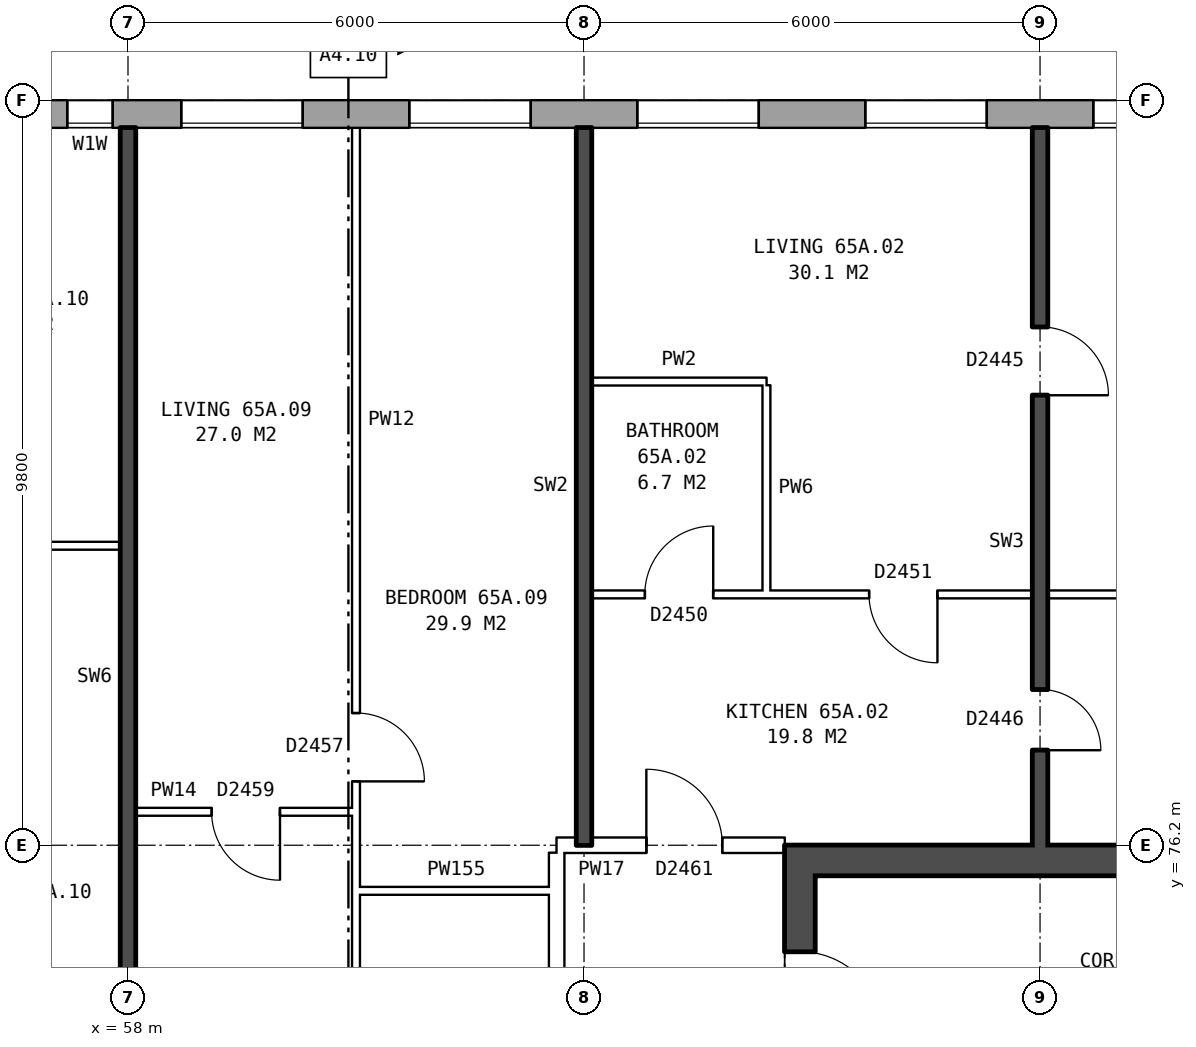
"""IFC4 building model, lengths in metres.
Left out: names, types, materials, properties, quantities, classifications, styles, units other than length and angle.
Written with IfcOpenShell. Run it as: python <this file> out.ifc"""

import sys

from ifc_helpers import new_model, si_unit, direction, frame, frame_2d, origin, place, context, subcontext, project, spatial, rectangle, extrude, element, fill, save


model = new_model("IFC4")
c1 = context("Model", 3, precision=1e-05, world=origin(), true_north=direction((0.0, 1.0)))
c2 = subcontext(c1, "Body", "Model", "MODEL_VIEW")
j1 = project(units=[si_unit("LENGTHUNIT", "METRE"), si_unit("PLANEANGLEUNIT", "RADIAN")], contexts=[c1])
p1 = place(None, origin())
s1 = spatial("IfcSite", under=j1, at=p1, CompositionType="ELEMENT")
p2 = place(p1, origin())
s2 = spatial("IfcBuilding", under=s1, at=p2, CompositionType="ELEMENT")
p3 = place(p2, frame((0.0, 0.0, 230.7)))
s3 = spatial("IfcBuildingStorey", under=s2, at=p3, CompositionType="ELEMENT", Elevation=230.7)
p4 = place(p3, frame((74.95, 85.82, 0.0), z_axis=(0.0, 0.0, 1.0), x_axis=(-1.0, 0.0, 0.0)))
e1 = element("IfcWall", 1, at=p4, inside=s3, PredefinedType="STANDARD", context=c2, shape_type="SweptSolid", body=[
    extrude(rectangle(XDim=39.875, YDim=0.36, at=frame_2d((19.938, 0.0))), origin(), (0.0, 0.0, 1.0), 2.85),
])
p5 = place(p4, frame((2.65, 0.0, 0.8)))
e2 = element("IfcOpeningElement", 2, at=p5, cuts=e1, PredefinedType="OPENING", context=c2, shape_type="SweptSolid", body=[
    extrude(rectangle(XDim=1.6, YDim=1.8, at=frame_2d((0.8, 0.9))), frame((0.0, 0.19, 0.0), z_axis=(0.0, -1.0, 0.0), x_axis=(1.0, 0.0, 0.0)), (0.0, 0.0, 1.0), 0.38),
])
p6 = place(p4, frame((5.65, 0.0, 0.8)))
e3 = element("IfcOpeningElement", 3, at=p6, cuts=e1, PredefinedType="OPENING", context=c2, shape_type="SweptSolid", body=[
    extrude(rectangle(XDim=1.6, YDim=1.8, at=frame_2d((0.8, 0.9))), frame((0.0, 0.19, 0.0), z_axis=(0.0, -1.0, 0.0), x_axis=(1.0, 0.0, 0.0)), (0.0, 0.0, 1.0), 0.38),
])
p7 = place(p4, frame((8.65, 0.0, 0.8)))
e4 = element("IfcOpeningElement", 4, at=p7, cuts=e1, PredefinedType="OPENING", context=c2, shape_type="SweptSolid", body=[
    extrude(rectangle(XDim=1.6, YDim=1.8, at=frame_2d((0.8, 0.9))), frame((0.0, 0.19, 0.0), z_axis=(0.0, -1.0, 0.0), x_axis=(1.0, 0.0, 0.0)), (0.0, 0.0, 1.0), 0.38),
])
p8 = place(p4, frame((11.65, 0.0, 0.8)))
e5 = element("IfcOpeningElement", 5, at=p8, cuts=e1, PredefinedType="OPENING", context=c2, shape_type="SweptSolid", body=[
    extrude(rectangle(XDim=1.6, YDim=1.8, at=frame_2d((0.8, 0.9))), frame((0.0, 0.19, 0.0), z_axis=(0.0, -1.0, 0.0), x_axis=(1.0, 0.0, 0.0)), (0.0, 0.0, 1.0), 0.38),
])
p9 = place(p4, frame((14.65, 0.0, 0.8)))
e6 = element("IfcOpeningElement", 6, at=p9, cuts=e1, PredefinedType="OPENING", context=c2, shape_type="SweptSolid", body=[
    extrude(rectangle(XDim=1.6, YDim=1.8, at=frame_2d((0.8, 0.9))), frame((0.0, 0.19, 0.0), z_axis=(0.0, -1.0, 0.0), x_axis=(1.0, 0.0, 0.0)), (0.0, 0.0, 1.0), 0.38),
])
p10 = place(p4, frame((17.15, 0.0, 1.7)))
e7 = element("IfcOpeningElement", 7, at=p10, cuts=e1, PredefinedType="OPENING", context=c2, shape_type="SweptSolid", body=[
    extrude(rectangle(XDim=0.6, YDim=0.9, at=frame_2d((0.3, 0.45))), frame((0.0, 0.19, 0.0), z_axis=(0.0, -1.0, 0.0), x_axis=(1.0, 0.0, 0.0)), (0.0, 0.0, 1.0), 0.38),
])
p11 = place(p4, frame((20.65, 0.0, 0.8)))
e8 = element("IfcOpeningElement", 8, at=p11, cuts=e1, PredefinedType="OPENING", context=c2, shape_type="SweptSolid", body=[
    extrude(rectangle(XDim=1.6, YDim=1.8, at=frame_2d((0.8, 0.9))), frame((0.0, 0.19, 0.0), z_axis=(0.0, -1.0, 0.0), x_axis=(1.0, 0.0, 0.0)), (0.0, 0.0, 1.0), 0.38),
])
p12 = place(p4, frame((24.7, 0.0, 0.8)))
e9 = element("IfcOpeningElement", 9, at=p12, cuts=e1, PredefinedType="OPENING", context=c2, shape_type="SweptSolid", body=[
    extrude(rectangle(XDim=1.0, YDim=1.8, at=frame_2d((0.5, 0.9))), frame((0.0, 0.19, 0.0), z_axis=(0.0, -1.0, 0.0), x_axis=(1.0, 0.0, 0.0)), (0.0, 0.0, 1.0), 0.38),
])
p13 = place(p4, frame((26.65, 0.0, 0.8)))
e10 = element("IfcOpeningElement", 10, at=p13, cuts=e1, PredefinedType="OPENING", context=c2, shape_type="SweptSolid", body=[
    extrude(rectangle(XDim=1.6, YDim=1.8, at=frame_2d((0.8, 0.9))), frame((0.0, 0.19, 0.0), z_axis=(0.0, -1.0, 0.0), x_axis=(1.0, 0.0, 0.0)), (0.0, 0.0, 1.0), 0.38),
])
p14 = place(p4, frame((29.65, 0.0, 0.8)))
e11 = element("IfcOpeningElement", 11, at=p14, cuts=e1, PredefinedType="OPENING", context=c2, shape_type="SweptSolid", body=[
    extrude(rectangle(XDim=1.6, YDim=1.8, at=frame_2d((0.8, 0.9))), frame((0.0, 0.19, 0.0), z_axis=(0.0, -1.0, 0.0), x_axis=(1.0, 0.0, 0.0)), (0.0, 0.0, 1.0), 0.38),
])
p15 = place(p4, frame((32.65, 0.0, 0.8)))
e12 = element("IfcOpeningElement", 12, at=p15, cuts=e1, PredefinedType="OPENING", context=c2, shape_type="SweptSolid", body=[
    extrude(rectangle(XDim=1.6, YDim=1.8, at=frame_2d((0.8, 0.9))), frame((0.0, 0.19, 0.0), z_axis=(0.0, -1.0, 0.0), x_axis=(1.0, 0.0, 0.0)), (0.0, 0.0, 1.0), 0.38),
])
p16 = place(p4, frame((35.65, 0.0, 0.8)))
e13 = element("IfcOpeningElement", 13, at=p16, cuts=e1, PredefinedType="OPENING", context=c2, shape_type="SweptSolid", body=[
    extrude(rectangle(XDim=1.6, YDim=1.8, at=frame_2d((0.8, 0.9))), frame((0.0, 0.19, 0.0), z_axis=(0.0, -1.0, 0.0), x_axis=(1.0, 0.0, 0.0)), (0.0, 0.0, 1.0), 0.38),
])
p17 = place(p4, frame((19.1, 0.0, 0.8)))
e14 = element("IfcOpeningElement", 14, at=p17, cuts=e1, PredefinedType="OPENING", context=c2, shape_type="SweptSolid", body=[
    extrude(rectangle(XDim=0.6, YDim=1.2, at=frame_2d((0.3, 0.6))), frame((0.0, 0.19, 0.0), z_axis=(0.0, -1.0, 0.0), x_axis=(1.0, 0.0, 0.0)), (0.0, 0.0, 1.0), 0.38),
])
p18 = place(p3, frame((66.84, 63.8, 0.0), z_axis=(0.0, 0.0, 1.0), x_axis=(0.0, 1.0, 0.0)))
e15 = element("IfcWall", 15, at=p18, inside=s3, PredefinedType="SHEAR", context=c2, shape_type="SweptSolid", body=[
    extrude(rectangle(XDim=12.4, YDim=0.4, at=frame_2d((6.2, 0.0))), origin(), (0.0, 0.0, 1.0), 2.85),
])
p19 = place(p18, frame((1.325, 0.0, 0.0)))
e16 = element("IfcOpeningElement", 16, at=p19, cuts=e15, PredefinedType="OPENING", context=c2, shape_type="SweptSolid", body=[
    extrude(rectangle(XDim=1.1, YDim=2.1, at=frame_2d((0.55, 1.05))), frame((0.0, 0.21, 0.0), z_axis=(0.0, -1.0, 0.0), x_axis=(1.0, 0.0, 0.0)), (0.0, 0.0, 1.0), 0.42),
])
p20 = place(p18, frame((3.6, 0.0, 0.0)))
e17 = element("IfcOpeningElement", 17, at=p20, cuts=e15, PredefinedType="OPENING", context=c2, shape_type="SweptSolid", body=[
    extrude(rectangle(XDim=1.1, YDim=2.1, at=frame_2d((0.55, 1.05))), frame((0.0, 0.21, 0.0), z_axis=(0.0, -1.0, 0.0), x_axis=(1.0, 0.0, 0.0)), (0.0, 0.0, 1.0), 0.42),
])
p21 = place(p18, frame((5.8, 0.0, 0.0)))
e18 = element("IfcOpeningElement", 18, at=p21, cuts=e15, PredefinedType="OPENING", context=c2, shape_type="SweptSolid", body=[
    extrude(rectangle(XDim=1.1, YDim=2.1, at=frame_2d((0.55, 1.05))), frame((0.0, 0.21, 0.0), z_axis=(0.0, -1.0, 0.0), x_axis=(1.0, 0.0, 0.0)), (0.0, 0.0, 1.0), 0.42),
])
p22 = place(p18, frame((8.0, 0.0, 0.0)))
e19 = element("IfcOpeningElement", 19, at=p22, cuts=e15, PredefinedType="OPENING", context=c2, shape_type="SweptSolid", body=[
    extrude(rectangle(XDim=1.1, YDim=2.1, at=frame_2d((0.55, 1.05))), frame((0.0, 0.21, 0.0), z_axis=(0.0, -1.0, 0.0), x_axis=(1.0, 0.0, 0.0)), (0.0, 0.0, 1.0), 0.42),
])
p23 = place(p18, frame((9.9, 0.0, 0.0)))
e20 = element("IfcOpeningElement", 20, at=p23, cuts=e15, PredefinedType="OPENING", context=c2, shape_type="SweptSolid", body=[
    extrude(rectangle(XDim=1.1, YDim=2.1, at=frame_2d((0.55, 1.05))), frame((0.0, 0.21, 0.0), z_axis=(0.0, -1.0, 0.0), x_axis=(1.0, 0.0, 0.0)), (0.0, 0.0, 1.0), 0.42),
])
p24 = place(p3, frame((67.04, 76.0, 0.0), z_axis=(0.0, 0.0, 1.0), x_axis=(1.0, 0.0, 0.0)))
e21 = element("IfcWall", 21, at=p24, inside=s3, PredefinedType="SHEAR", context=c2, shape_type="SweptSolid", body=[
    extrude(rectangle(XDim=8.2, YDim=0.4, at=frame_2d((4.1, 0.0))), origin(), (0.0, 0.0, 1.0), 2.85),
])
p25 = place(p3, frame((63.64, 63.9, 0.0), z_axis=(0.0, 0.0, 1.0), x_axis=(0.0, 1.0, 0.0)))
e22 = element("IfcWall", 22, at=p25, inside=s3, PredefinedType="PARTITIONING", context=c2, shape_type="SweptSolid", body=[
    extrude(rectangle(XDim=12.2, YDim=0.2, at=frame_2d((6.1, 0.0))), origin(), (0.0, 0.0, 1.0), 2.85),
])
p26 = place(p25, frame((5.1, 0.0, 0.0)))
e23 = element("IfcOpeningElement", 23, at=p26, cuts=e22, PredefinedType="OPENING", context=c2, shape_type="SweptSolid", body=[
    extrude(rectangle(XDim=2.0, YDim=2.1, at=frame_2d((1.0, 1.05))), frame((0.0, 0.11, 0.0), z_axis=(0.0, -1.0, 0.0), x_axis=(1.0, 0.0, 0.0)), (0.0, 0.0, 1.0), 0.22),
])
p27 = place(p3, frame((61.0, 75.6, 0.0), z_axis=(0.0, 0.0, 1.0), x_axis=(1.0, 0.0, 0.0)))
e24 = element("IfcWall", 24, at=p27, inside=s3, PredefinedType="PARTITIONING", context=c2, shape_type="SweptSolid", body=[
    extrude(rectangle(XDim=2.64, YDim=0.1, at=frame_2d((1.32, 0.0))), origin(), (0.0, 0.0, 1.0), 2.85),
])
p28 = place(p3, frame((63.64, 76.2, 0.0), z_axis=(0.0, 0.0, 1.0), x_axis=(1.0, 0.0, 0.0)))
e25 = element("IfcWall", 25, at=p28, inside=s3, PredefinedType="PARTITIONING", context=c2, shape_type="SweptSolid", body=[
    extrude(rectangle(XDim=3.0, YDim=0.2, at=frame_2d((1.5, 0.0))), origin(), (0.0, 0.0, 1.0), 2.85),
])
p29 = place(p28, frame((1.18, 0.0, 0.0)))
e26 = element("IfcOpeningElement", 26, at=p29, cuts=e25, PredefinedType="OPENING", context=c2, shape_type="SweptSolid", body=[
    extrude(rectangle(XDim=1.0, YDim=2.1, at=frame_2d((0.5, 1.05))), frame((0.0, 0.11, 0.0), z_axis=(0.0, -1.0, 0.0), x_axis=(1.0, 0.0, 0.0)), (0.0, 0.0, 1.0), 0.22),
])
p30 = place(p3, frame((58.1, 76.64, 0.0), z_axis=(0.0, 0.0, 1.0), x_axis=(1.0, 0.0, 0.0)))
e27 = element("IfcWall", 27, at=p30, inside=s3, PredefinedType="PARTITIONING", context=c2, shape_type="SweptSolid", body=[
    extrude(rectangle(XDim=2.9, YDim=0.1, at=frame_2d((1.45, 0.0))), origin(), (0.0, 0.0, 1.0), 2.85),
])
p31 = place(p30, frame((1.0, 0.0, 0.0)))
e28 = element("IfcOpeningElement", 28, at=p31, cuts=e27, PredefinedType="OPENING", context=c2, shape_type="SweptSolid", body=[
    extrude(rectangle(XDim=0.9, YDim=2.1, at=frame_2d((0.45, 1.05))), frame((0.0, 0.06, 0.0), z_axis=(0.0, -1.0, 0.0), x_axis=(1.0, 0.0, 0.0)), (0.0, 0.0, 1.0), 0.12),
])
p32 = place(p3, frame((64.1, 79.5, 0.0), z_axis=(0.0, 0.0, 1.0), x_axis=(1.0, 0.0, 0.0)))
e29 = element("IfcWall", 29, at=p32, inside=s3, PredefinedType="PARTITIONING", context=c2, shape_type="SweptSolid", body=[
    extrude(rectangle(XDim=11.8, YDim=0.1, at=frame_2d((5.9, 0.0))), origin(), (0.0, 0.0, 1.0), 2.85),
])
p33 = place(p32, frame((3.65, 0.0, 0.0)))
e30 = element("IfcOpeningElement", 30, at=p33, cuts=e29, PredefinedType="OPENING", context=c2, shape_type="SweptSolid", body=[
    extrude(rectangle(XDim=0.9, YDim=2.1, at=frame_2d((0.45, 1.05))), frame((0.0, 0.06, 0.0), z_axis=(0.0, -1.0, 0.0), x_axis=(1.0, 0.0, 0.0)), (0.0, 0.0, 1.0), 0.12),
])
p34 = place(p32, frame((0.7, 0.0, 0.0)))
e31 = element("IfcOpeningElement", 31, at=p34, cuts=e29, PredefinedType="OPENING", context=c2, shape_type="SweptSolid", body=[
    extrude(rectangle(XDim=0.9, YDim=2.1, at=frame_2d((0.45, 1.05))), frame((0.0, 0.06, 0.0), z_axis=(0.0, -1.0, 0.0), x_axis=(1.0, 0.0, 0.0)), (0.0, 0.0, 1.0), 0.12),
])
p35 = place(p3, frame((55.0, 80.14, 0.0), z_axis=(0.0, 0.0, 1.0), x_axis=(1.0, 0.0, 0.0)))
e32 = element("IfcWall", 32, at=p35, inside=s3, PredefinedType="PARTITIONING", context=c2, shape_type="SweptSolid", body=[
    extrude(rectangle(XDim=2.9, YDim=0.1, at=frame_2d((1.45, 0.0))), origin(), (0.0, 0.0, 1.0), 2.85),
])
p36 = place(p35, frame((1.0, 0.0, 0.0)))
e33 = element("IfcOpeningElement", 33, at=p36, cuts=e32, PredefinedType="OPENING", context=c2, shape_type="SweptSolid", body=[
    extrude(rectangle(XDim=0.9, YDim=2.1, at=frame_2d((0.45, 1.05))), frame((0.0, 0.06, 0.0), z_axis=(0.0, -1.0, 0.0), x_axis=(1.0, 0.0, 0.0)), (0.0, 0.0, 1.0), 0.12),
])
p37 = place(p3, frame((64.1, 82.3, 0.0), z_axis=(0.0, 0.0, 1.0), x_axis=(1.0, 0.0, 0.0)))
e34 = element("IfcWall", 34, at=p37, inside=s3, PredefinedType="PARTITIONING", context=c2, shape_type="SweptSolid", body=[
    extrude(rectangle(XDim=2.3, YDim=0.1, at=frame_2d((1.15, 0.0))), origin(), (0.0, 0.0, 1.0), 2.85),
])
p38 = place(p3, frame((58.0, 71.2, 0.0), z_axis=(0.0, 0.0, 1.0), x_axis=(0.0, 1.0, 0.0)))
e35 = element("IfcWall", 35, at=p38, inside=s3, PredefinedType="SOLIDWALL", context=c2, shape_type="SweptSolid", body=[
    extrude(rectangle(XDim=14.44, YDim=0.2, at=frame_2d((7.22, 0.0))), origin(), (0.0, 0.0, 1.0), 2.85),
])
p39 = place(p3, frame((61.0, 71.3, 0.0), z_axis=(0.0, 0.0, 1.0), x_axis=(0.0, 1.0, 0.0)))
e36 = element("IfcWall", 36, at=p39, inside=s3, PredefinedType="PARTITIONING", context=c2, shape_type="SweptSolid", body=[
    extrude(rectangle(XDim=14.34, YDim=0.1, at=frame_2d((7.17, 0.0))), origin(), (0.0, 0.0, 1.0), 2.85),
])
p40 = place(p39, frame((5.74, 0.0, 0.0)))
e37 = element("IfcOpeningElement", 37, at=p40, cuts=e36, PredefinedType="OPENING", context=c2, shape_type="SweptSolid", body=[
    extrude(rectangle(XDim=0.9, YDim=2.1, at=frame_2d((0.45, 1.05))), frame((0.0, 0.06, 0.0), z_axis=(0.0, -1.0, 0.0), x_axis=(1.0, 0.0, 0.0)), (0.0, 0.0, 1.0), 0.12),
])
p41 = place(p39, frame((0.4, 0.0, 0.0)))
e38 = element("IfcOpeningElement", 38, at=p41, cuts=e36, PredefinedType="OPENING", context=c2, shape_type="SweptSolid", body=[
    extrude(rectangle(XDim=0.9, YDim=2.1, at=frame_2d((0.45, 1.05))), frame((0.0, 0.06, 0.0), z_axis=(0.0, -1.0, 0.0), x_axis=(1.0, 0.0, 0.0)), (0.0, 0.0, 1.0), 0.12),
])
p42 = place(p3, frame((64.0, 76.2, 0.0), z_axis=(0.0, 0.0, 1.0), x_axis=(0.0, 1.0, 0.0)))
e39 = element("IfcWall", 39, at=p42, inside=s3, PredefinedType="SOLIDWALL", context=c2, shape_type="SweptSolid", body=[
    extrude(rectangle(XDim=9.44, YDim=0.2, at=frame_2d((4.72, 0.0))), origin(), (0.0, 0.0, 1.0), 2.85),
])
p43 = place(p3, frame((66.4, 79.55, 0.0), z_axis=(0.0, 0.0, 1.0), x_axis=(0.0, 1.0, 0.0)))
e40 = element("IfcWall", 40, at=p43, inside=s3, PredefinedType="PARTITIONING", context=c2, shape_type="SweptSolid", body=[
    extrude(rectangle(XDim=2.7, YDim=0.1, at=frame_2d((1.35, 0.0))), origin(), (0.0, 0.0, 1.0), 2.85),
])
p44 = place(p3, frame((70.0, 76.2, 0.0), z_axis=(0.0, 0.0, 1.0), x_axis=(0.0, 1.0, 0.0)))
e41 = element("IfcWall", 41, at=p44, inside=s3, PredefinedType="SOLIDWALL", context=c2, shape_type="SweptSolid", body=[
    extrude(rectangle(XDim=9.44, YDim=0.2, at=frame_2d((4.72, 0.0))), origin(), (0.0, 0.0, 1.0), 2.85),
])
p45 = place(p44, frame((5.92, 0.0, 0.0)))
e42 = element("IfcOpeningElement", 42, at=p45, cuts=e41, PredefinedType="OPENING", context=c2, shape_type="SweptSolid", body=[
    extrude(rectangle(XDim=0.9, YDim=2.1, at=frame_2d((0.45, 1.05))), frame((0.0, 0.11, 0.0), z_axis=(0.0, -1.0, 0.0), x_axis=(1.0, 0.0, 0.0)), (0.0, 0.0, 1.0), 0.22),
])
p46 = place(p44, frame((1.25, 0.0, 0.0)))
e43 = element("IfcOpeningElement", 43, at=p46, cuts=e41, PredefinedType="OPENING", context=c2, shape_type="SweptSolid", body=[
    extrude(rectangle(XDim=0.8, YDim=2.1, at=frame_2d((0.4, 1.05))), frame((0.0, 0.11, 0.0), z_axis=(0.0, -1.0, 0.0), x_axis=(1.0, 0.0, 0.0)), (0.0, 0.0, 1.0), 0.22),
])
p47 = place(p5, origin())
e44 = element("IfcWindow", 44, at=p47, inside=s3, PartitioningType="SINGLE_PANEL", PredefinedType="WINDOW", context=c2, shape_type="SweptSolid", body=[
    extrude(rectangle(XDim=1.6, YDim=1.8, at=frame_2d((0.8, 0.9))), frame((0.0, 0.15, 0.0), z_axis=(0.0, -1.0, 0.0), x_axis=(1.0, 0.0, 0.0)), (0.0, 0.0, 1.0), 0.06),
])
fill(e2, e44)
p48 = place(p6, origin())
e45 = element("IfcWindow", 45, at=p48, inside=s3, PartitioningType="SINGLE_PANEL", PredefinedType="WINDOW", context=c2, shape_type="SweptSolid", body=[
    extrude(rectangle(XDim=1.6, YDim=1.8, at=frame_2d((0.8, 0.9))), frame((0.0, 0.15, 0.0), z_axis=(0.0, -1.0, 0.0), x_axis=(1.0, 0.0, 0.0)), (0.0, 0.0, 1.0), 0.06),
])
fill(e3, e45)
p49 = place(p7, origin())
e46 = element("IfcWindow", 46, at=p49, inside=s3, PartitioningType="SINGLE_PANEL", PredefinedType="WINDOW", context=c2, shape_type="SweptSolid", body=[
    extrude(rectangle(XDim=1.6, YDim=1.8, at=frame_2d((0.8, 0.9))), frame((0.0, 0.15, 0.0), z_axis=(0.0, -1.0, 0.0), x_axis=(1.0, 0.0, 0.0)), (0.0, 0.0, 1.0), 0.06),
])
fill(e4, e46)
p50 = place(p8, origin())
e47 = element("IfcWindow", 47, at=p50, inside=s3, PartitioningType="SINGLE_PANEL", PredefinedType="WINDOW", context=c2, shape_type="SweptSolid", body=[
    extrude(rectangle(XDim=1.6, YDim=1.8, at=frame_2d((0.8, 0.9))), frame((0.0, 0.15, 0.0), z_axis=(0.0, -1.0, 0.0), x_axis=(1.0, 0.0, 0.0)), (0.0, 0.0, 1.0), 0.06),
])
fill(e5, e47)
p51 = place(p9, origin())
e48 = element("IfcWindow", 48, at=p51, inside=s3, PartitioningType="SINGLE_PANEL", PredefinedType="WINDOW", context=c2, shape_type="SweptSolid", body=[
    extrude(rectangle(XDim=1.6, YDim=1.8, at=frame_2d((0.8, 0.9))), frame((0.0, 0.15, 0.0), z_axis=(0.0, -1.0, 0.0), x_axis=(1.0, 0.0, 0.0)), (0.0, 0.0, 1.0), 0.06),
])
fill(e6, e48)
p52 = place(p10, origin())
e49 = element("IfcWindow", 49, at=p52, inside=s3, PartitioningType="SINGLE_PANEL", PredefinedType="WINDOW", context=c2, shape_type="SweptSolid", body=[
    extrude(rectangle(XDim=0.6, YDim=0.9, at=frame_2d((0.3, 0.45))), frame((0.0, 0.15, 0.0), z_axis=(0.0, -1.0, 0.0), x_axis=(1.0, 0.0, 0.0)), (0.0, 0.0, 1.0), 0.06),
])
fill(e7, e49)
p53 = place(p23, frame((1.1, 0.0, 0.0), z_axis=(0.0, 0.0, 1.0), x_axis=(-1.0, 0.0, 0.0)))
e50 = element("IfcDoor", 50, at=p53, inside=s3, OperationType="SINGLE_SWING_RIGHT", PredefinedType="DOOR", context=c2, shape_type="SweptSolid", body=[
    extrude(rectangle(XDim=1.1, YDim=2.1, at=frame_2d((0.55, 1.05))), frame((0.0, 0.185, 0.0), z_axis=(0.0, -1.0, 0.0), x_axis=(1.0, 0.0, 0.0)), (0.0, 0.0, 1.0), 0.05),
])
fill(e20, e50)
p54 = place(p45, frame((0.9, 0.0, 0.0), z_axis=(0.0, 0.0, 1.0), x_axis=(-1.0, 0.0, 0.0)))
e51 = element("IfcDoor", 51, at=p54, inside=s3, OperationType="SINGLE_SWING_RIGHT", PredefinedType="DOOR", context=c2, shape_type="SweptSolid", body=[
    extrude(rectangle(XDim=0.9, YDim=2.1, at=frame_2d((0.45, 1.05))), frame((0.0, 0.025, 0.0), z_axis=(0.0, -1.0, 0.0), x_axis=(1.0, 0.0, 0.0)), (0.0, 0.0, 1.0), 0.05),
])
fill(e42, e51)
p55 = place(p29, origin())
e52 = element("IfcDoor", 52, at=p55, inside=s3, OperationType="SINGLE_SWING_LEFT", PredefinedType="DOOR", context=c2, shape_type="SweptSolid", body=[
    extrude(rectangle(XDim=1.0, YDim=2.1, at=frame_2d((0.5, 1.05))), frame((0.0, 0.025, 0.0), z_axis=(0.0, -1.0, 0.0), x_axis=(1.0, 0.0, 0.0)), (0.0, 0.0, 1.0), 0.05),
])
fill(e26, e52)
p56 = place(p33, frame((0.9, 0.0, 0.0), z_axis=(0.0, 0.0, 1.0), x_axis=(-1.0, 0.0, 0.0)))
e53 = element("IfcDoor", 53, at=p56, inside=s3, OperationType="SINGLE_SWING_LEFT", PredefinedType="DOOR", context=c2, shape_type="SweptSolid", body=[
    extrude(rectangle(XDim=0.9, YDim=2.1, at=frame_2d((0.45, 1.05))), frame((0.0, 0.025, 0.0), z_axis=(0.0, -1.0, 0.0), x_axis=(1.0, 0.0, 0.0)), (0.0, 0.0, 1.0), 0.05),
])
fill(e30, e53)
p57 = place(p46, frame((0.8, 0.0, 0.0), z_axis=(0.0, 0.0, 1.0), x_axis=(-1.0, 0.0, 0.0)))
e54 = element("IfcDoor", 54, at=p57, inside=s3, OperationType="SINGLE_SWING_RIGHT", PredefinedType="DOOR", context=c2, shape_type="SweptSolid", body=[
    extrude(rectangle(XDim=0.8, YDim=2.1, at=frame_2d((0.4, 1.05))), frame((0.0, 0.025, 0.0), z_axis=(0.0, -1.0, 0.0), x_axis=(1.0, 0.0, 0.0)), (0.0, 0.0, 1.0), 0.05),
])
fill(e43, e54)
p58 = place(p34, origin())
e55 = element("IfcDoor", 55, at=p58, inside=s3, OperationType="SINGLE_SWING_RIGHT", PredefinedType="DOOR", context=c2, shape_type="SweptSolid", body=[
    extrude(rectangle(XDim=0.9, YDim=2.1, at=frame_2d((0.45, 1.05))), frame((0.0, 0.025, 0.0), z_axis=(0.0, -1.0, 0.0), x_axis=(1.0, 0.0, 0.0)), (0.0, 0.0, 1.0), 0.05),
])
fill(e31, e55)
p59 = place(p40, frame((0.9, 0.0, 0.0), z_axis=(0.0, 0.0, 1.0), x_axis=(-1.0, 0.0, 0.0)))
e56 = element("IfcDoor", 56, at=p59, inside=s3, OperationType="SINGLE_SWING_RIGHT", PredefinedType="DOOR", context=c2, shape_type="SweptSolid", body=[
    extrude(rectangle(XDim=0.9, YDim=2.1, at=frame_2d((0.45, 1.05))), frame((0.0, 0.025, 0.0), z_axis=(0.0, -1.0, 0.0), x_axis=(1.0, 0.0, 0.0)), (0.0, 0.0, 1.0), 0.05),
])
fill(e37, e56)
p60 = place(p31, frame((0.9, 0.0, 0.0), z_axis=(0.0, 0.0, 1.0), x_axis=(-1.0, 0.0, 0.0)))
e57 = element("IfcDoor", 57, at=p60, inside=s3, OperationType="SINGLE_SWING_LEFT", PredefinedType="DOOR", context=c2, shape_type="SweptSolid", body=[
    extrude(rectangle(XDim=0.9, YDim=2.1, at=frame_2d((0.45, 1.05))), frame((0.0, 0.025, 0.0), z_axis=(0.0, -1.0, 0.0), x_axis=(1.0, 0.0, 0.0)), (0.0, 0.0, 1.0), 0.05),
])
fill(e28, e57)
save(model, sys.argv[1])
